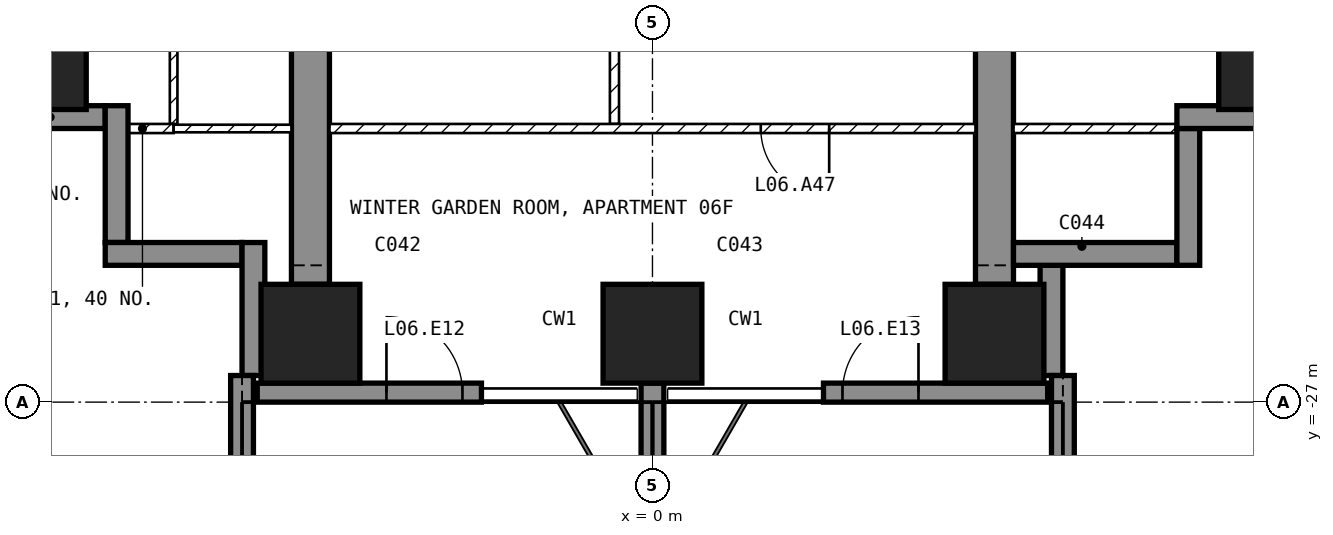
"""IFC4 building model, lengths in metres.
Left out: names, types, materials, properties, quantities, classifications, styles, units other than length and angle.
Written with IfcOpenShell. Run it as: python <this file> out.ifc"""

import sys

from ifc_helpers import new_model, si_unit, direction, frame, frame_2d, origin, origin_2d, place, context, subcontext, project, spatial, polyline, rectangle, outline, extrude, element, fill, save


model = new_model("IFC4")
c1 = context("Model", 3, precision=1e-05, world=origin(), true_north=direction((0.0, 1.0)))
c2 = subcontext(c1, "Body", "Model", "MODEL_VIEW")
j1 = project(units=[si_unit("LENGTHUNIT", "METRE"), si_unit("PLANEANGLEUNIT", "RADIAN")], contexts=[c1])
p1 = place(None, origin())
s1 = spatial("IfcSite", under=j1, at=p1, CompositionType="ELEMENT")
p2 = place(p1, origin())
s2 = spatial("IfcBuilding", under=s1, at=p2, CompositionType="ELEMENT")
p3 = place(p2, frame((0.0, 0.0, 40.0)))
s3 = spatial("IfcBuildingStorey", under=s2, at=p3, CompositionType="ELEMENT", Elevation=40.0)
for number, where, z_axis, x_axis in (
    (1, (-8.1, -22.5, -0.25), (0.0, 0.0, 1.0), (1.0, 0.0, 0.0)),
    (2, (-4.5, -26.1, -0.25), (0.0, 0.0, 1.0), (1.0, 0.0, 0.0)),
    (3, (0.0, -26.1, -0.25), (0.0, 0.0, 1.0), (1.0, 0.0, 0.0)),
    (4, (4.5, -26.1, -0.25), (0.0, 0.0, 1.0), (1.0, 0.0, 0.0)),
    (5, (8.1, -22.5, -0.25), (0.0, 0.0, 1.0), (1.0, 0.0, 0.0)),
):
    element("IfcColumn", number, at=place(p3, frame(where, z_axis=z_axis, x_axis=x_axis)), inside=s3, PredefinedType="COLUMN", context=c2, shape_type="SweptSolid", body=[
        extrude(rectangle(XDim=1.3, YDim=1.3, at=origin_2d()), origin(), (0.0, 0.0, 1.0), 3.5),
    ])
for number, where, z_axis, x_axis in (
    (6, (-4.75, -25.45, -0.25), (1.0, 0.0, 0.0), (0.0, 1.0, 0.0)),
    (7, (4.25, -25.45, -0.25), (1.0, 0.0, 0.0), (0.0, 1.0, 0.0)),
):
    element("IfcWall", number, at=place(p3, frame(where, z_axis=z_axis, x_axis=x_axis)), inside=s3, PredefinedType="SHEAR", context=c2, shape_type="SweptSolid", body=[
        extrude(outline(polyline([(0.0, 0.0), (4.15, 0.0), (4.15, 2.65), (6.55, 2.65), (6.55, 0.0), (11.95, 0.0), (11.95, 2.65), (14.35, 2.65), (14.35, 0.0), (16.45, 0.0), (16.45, 3.5), (0.0, 3.5), (0.0, 0.0)])), origin(), (0.0, 0.0, 1.0), 0.5),
    ])
p4 = place(p3, frame((-5.2, -26.875, 0.0), z_axis=(0.0, 0.0, 1.0), x_axis=(1.0, 0.0, 0.0)))
e8 = element("IfcWall", 8, at=p4, inside=s3, PredefinedType="SOLIDWALL", context=c2, shape_type="SweptSolid", body=[
    extrude(rectangle(XDim=2.95, YDim=0.25, at=frame_2d((1.475, 0.0))), origin(), (0.0, 0.0, 1.0), 3.25),
])
p5 = place(p4, frame((1.7, 0.0, 0.0)))
e9 = element("IfcOpeningElement", 9, at=p5, cuts=e8, PredefinedType="OPENING", context=c2, shape_type="SweptSolid", body=[
    extrude(rectangle(XDim=1.0, YDim=2.4, at=frame_2d((0.5, 1.2))), frame((0.0, 0.135, 0.0), z_axis=(0.0, -1.0, 0.0), x_axis=(1.0, 0.0, 0.0)), (0.0, 0.0, 1.0), 0.27),
])
p6 = place(p3, frame((2.25, -26.875, 0.0), z_axis=(0.0, 0.0, 1.0), x_axis=(1.0, 0.0, 0.0)))
e10 = element("IfcWall", 10, at=p6, inside=s3, PredefinedType="SOLIDWALL", context=c2, shape_type="SweptSolid", body=[
    extrude(rectangle(XDim=2.95, YDim=0.25, at=frame_2d((1.475, 0.0))), origin(), (0.0, 0.0, 1.0), 3.25),
])
p7 = place(p6, frame((0.25, 0.0, 0.0)))
e11 = element("IfcOpeningElement", 11, at=p7, cuts=e10, PredefinedType="OPENING", context=c2, shape_type="SweptSolid", body=[
    extrude(rectangle(XDim=1.0, YDim=2.4, at=frame_2d((0.5, 1.2))), frame((0.0, 0.135, 0.0), z_axis=(0.0, -1.0, 0.0), x_axis=(1.0, 0.0, 0.0)), (0.0, 0.0, 1.0), 0.27),
])
p8 = place(p3, frame((5.25, -26.65, 0.0), z_axis=(0.0, 0.0, 1.0), x_axis=(0.0, 1.0, 0.0)))
e12 = element("IfcWall", 12, at=p8, inside=s3, PredefinedType="SOLIDWALL", context=c2, shape_type="SweptSolid", body=[
    extrude(rectangle(XDim=1.45, YDim=0.3, at=frame_2d((0.725, 0.0))), origin(), (0.0, 0.0, 1.0), 3.25),
])
p9 = place(p3, frame((4.75, -25.05, 0.0), z_axis=(0.0, 0.0, 1.0), x_axis=(1.0, 0.0, 0.0)))
e13 = element("IfcWall", 13, at=p9, inside=s3, PredefinedType="SOLIDWALL", context=c2, shape_type="SweptSolid", body=[
    extrude(rectangle(XDim=2.15, YDim=0.3, at=frame_2d((1.075, 0.0))), origin(), (0.0, 0.0, 1.0), 3.25),
])
p10 = place(p3, frame((7.05, -25.2, 0.0), z_axis=(0.0, 0.0, 1.0), x_axis=(0.0, 1.0, 0.0)))
e14 = element("IfcWall", 14, at=p10, inside=s3, PredefinedType="SOLIDWALL", context=c2, shape_type="SweptSolid", body=[
    extrude(rectangle(XDim=1.8, YDim=0.3, at=frame_2d((0.9, 0.0))), origin(), (0.0, 0.0, 1.0), 3.25),
])
p11 = place(p3, frame((6.9, -23.25, 0.0), z_axis=(0.0, 0.0, 1.0), x_axis=(1.0, 0.0, 0.0)))
e15 = element("IfcWall", 15, at=p11, inside=s3, PredefinedType="SOLIDWALL", context=c2, shape_type="SweptSolid", body=[
    extrude(rectangle(XDim=1.75, YDim=0.3, at=frame_2d((0.875, 0.0))), origin(), (0.0, 0.0, 1.0), 3.25),
])
p12 = place(p3, frame((-8.65, -23.25, 0.0), z_axis=(0.0, 0.0, 1.0), x_axis=(1.0, 0.0, 0.0)))
e16 = element("IfcWall", 16, at=p12, inside=s3, PredefinedType="SOLIDWALL", context=c2, shape_type="SweptSolid", body=[
    extrude(rectangle(XDim=1.45, YDim=0.3, at=frame_2d((0.725, 0.0))), origin(), (0.0, 0.0, 1.0), 3.25),
])
p13 = place(p3, frame((-7.05, -23.1, 0.0), z_axis=(0.0, 0.0, 1.0), x_axis=(0.0, -1.0, 0.0)))
e17 = element("IfcWall", 17, at=p13, inside=s3, PredefinedType="SOLIDWALL", context=c2, shape_type="SweptSolid", body=[
    extrude(rectangle(XDim=1.8, YDim=0.3, at=frame_2d((0.9, 0.0))), origin(), (0.0, 0.0, 1.0), 3.25),
])
p14 = place(p3, frame((-7.2, -25.05, 0.0), z_axis=(0.0, 0.0, 1.0), x_axis=(1.0, 0.0, 0.0)))
e18 = element("IfcWall", 18, at=p14, inside=s3, PredefinedType="SOLIDWALL", context=c2, shape_type="SweptSolid", body=[
    extrude(rectangle(XDim=1.8, YDim=0.3, at=frame_2d((0.9, 0.0))), origin(), (0.0, 0.0, 1.0), 3.25),
])
p15 = place(p3, frame((-5.25, -24.9, 0.0), z_axis=(0.0, 0.0, 1.0), x_axis=(0.0, -1.0, 0.0)))
e19 = element("IfcWall", 19, at=p15, inside=s3, PredefinedType="SOLIDWALL", context=c2, shape_type="SweptSolid", body=[
    extrude(rectangle(XDim=1.75, YDim=0.3, at=frame_2d((0.875, 0.0))), origin(), (0.0, 0.0, 1.0), 3.25),
])
p16 = place(p3, frame((-5.4, -26.65, 0.0), z_axis=(0.0, 0.0, 1.0), x_axis=(0.0, -1.0, 0.0)))
e20 = element("IfcWall", 20, at=p16, inside=s3, PredefinedType="SOLIDWALL", context=c2, shape_type="SweptSolid", body=[
    extrude(rectangle(XDim=3.05, YDim=0.3, at=frame_2d((1.525, 0.0))), origin(), (0.0, 0.0, 1.0), 3.25),
])
p17 = place(p3, frame((0.0, -26.75, 0.0), z_axis=(0.0, 0.0, 1.0), x_axis=(0.0, -1.0, 0.0)))
e21 = element("IfcWall", 21, at=p17, inside=s3, PredefinedType="SOLIDWALL", context=c2, shape_type="SweptSolid", body=[
    extrude(rectangle(XDim=2.95, YDim=0.3, at=frame_2d((1.475, 0.0))), origin(), (0.0, 0.0, 1.0), 3.25),
])
p18 = place(p3, frame((5.4, -26.65, 0.0), z_axis=(0.0, 0.0, 1.0), x_axis=(0.0, -1.0, 0.0)))
e22 = element("IfcWall", 22, at=p18, inside=s3, PredefinedType="SOLIDWALL", context=c2, shape_type="SweptSolid", body=[
    extrude(rectangle(XDim=3.05, YDim=0.3, at=frame_2d((1.525, 0.0))), origin(), (0.0, 0.0, 1.0), 3.25),
])
p19 = place(p3, frame((-0.5, -23.34, 0.0), z_axis=(0.0, 0.0, 1.0), x_axis=(0.0, 1.0, 0.0)))
e23 = element("IfcWall", 23, at=p19, inside=s3, PredefinedType="PARTITIONING", context=c2, shape_type="SweptSolid", body=[
    extrude(rectangle(XDim=4.38, YDim=0.12, at=frame_2d((2.19, 0.0))), origin(), (0.0, 0.0, 1.0), 3.25),
])
p20 = place(p19, frame((1.74, 0.0, 0.0)))
e24 = element("IfcOpeningElement", 24, at=p20, cuts=e23, PredefinedType="OPENING", context=c2, shape_type="SweptSolid", body=[
    extrude(rectangle(XDim=0.9, YDim=2.1, at=frame_2d((0.45, 1.05))), frame((0.0, 0.07, 0.0), z_axis=(0.0, -1.0, 0.0), x_axis=(1.0, 0.0, 0.0)), (0.0, 0.0, 1.0), 0.14),
])
p21 = place(p3, frame((4.25, -23.4, 0.0), z_axis=(0.0, 0.0, 1.0), x_axis=(-1.0, 0.0, 0.0)))
e25 = element("IfcWall", 25, at=p21, inside=s3, PredefinedType="PARTITIONING", context=c2, shape_type="SweptSolid", body=[
    extrude(rectangle(XDim=8.5, YDim=0.12, at=frame_2d((4.25, 0.0))), origin(), (0.0, 0.0, 1.0), 3.25),
])
p22 = place(p21, frame((1.925, 0.0, 0.0)))
e26 = element("IfcOpeningElement", 26, at=p22, cuts=e25, PredefinedType="OPENING", context=c2, shape_type="SweptSolid", body=[
    extrude(rectangle(XDim=0.9, YDim=2.1, at=frame_2d((0.45, 1.05))), frame((0.0, 0.07, 0.0), z_axis=(0.0, -1.0, 0.0), x_axis=(1.0, 0.0, 0.0)), (0.0, 0.0, 1.0), 0.14),
])
p23 = place(p3, frame((7.12, -23.4, 0.0), z_axis=(0.0, 0.0, 1.0), x_axis=(-1.0, 0.0, 0.0)))
e27 = element("IfcWall", 27, at=p23, inside=s3, PredefinedType="PARTITIONING", context=c2, shape_type="SweptSolid", body=[
    extrude(rectangle(XDim=2.37, YDim=0.12, at=frame_2d((1.185, 0.0))), origin(), (0.0, 0.0, 1.0), 3.25),
])
p24 = place(p3, frame((-6.3, -20.45, 0.0), z_axis=(0.0, 0.0, 1.0), x_axis=(0.0, -1.0, 0.0)))
e28 = element("IfcWall", 28, at=p24, inside=s3, PredefinedType="PARTITIONING", context=c2, shape_type="SweptSolid", body=[
    extrude(rectangle(XDim=2.89, YDim=0.1, at=frame_2d((1.445, 0.0))), origin(), (0.0, 0.0, 1.0), 3.25),
])
p25 = place(p3, frame((-6.3, -23.4, 0.0), z_axis=(0.0, 0.0, 1.0), x_axis=(-1.0, 0.0, 0.0)))
e29 = element("IfcWall", 29, at=p25, inside=s3, PredefinedType="PARTITIONING", context=c2, shape_type="SweptSolid", body=[
    extrude(rectangle(XDim=0.82, YDim=0.12, at=frame_2d((0.41, 0.0))), origin(), (0.0, 0.0, 1.0), 3.25),
])
p26 = place(p3, frame((-4.75, -23.4, 0.0), z_axis=(0.0, 0.0, 1.0), x_axis=(-1.0, 0.0, 0.0)))
e30 = element("IfcWall", 30, at=p26, inside=s3, PredefinedType="PARTITIONING", context=c2, shape_type="SweptSolid", body=[
    extrude(rectangle(XDim=1.55, YDim=0.1, at=frame_2d((0.775, 0.0))), origin(), (0.0, 0.0, 1.0), 3.25),
])
p27 = place(p5, origin())
e31 = element("IfcDoor", 31, at=p27, inside=s3, OperationType="SINGLE_SWING_LEFT", PredefinedType="DOOR", context=c2, shape_type="SweptSolid", body=[
    extrude(rectangle(XDim=1.0, YDim=2.4, at=frame_2d((0.5, 1.2))), frame((0.0, 0.025, 0.0), z_axis=(0.0, -1.0, 0.0), x_axis=(1.0, 0.0, 0.0)), (0.0, 0.0, 1.0), 0.05),
])
fill(e9, e31)
p28 = place(p7, origin())
e32 = element("IfcDoor", 32, at=p28, inside=s3, OperationType="SINGLE_SWING_RIGHT", PredefinedType="DOOR", context=c2, shape_type="SweptSolid", body=[
    extrude(rectangle(XDim=1.0, YDim=2.4, at=frame_2d((0.5, 1.2))), frame((0.0, 0.025, 0.0), z_axis=(0.0, -1.0, 0.0), x_axis=(1.0, 0.0, 0.0)), (0.0, 0.0, 1.0), 0.05),
])
fill(e11, e32)
p29 = place(p22, origin())
e33 = element("IfcDoor", 33, at=p29, inside=s3, OperationType="SINGLE_SWING_LEFT", PredefinedType="DOOR", context=c2, shape_type="SweptSolid", body=[
    extrude(rectangle(XDim=0.9, YDim=2.1, at=frame_2d((0.45, 1.05))), frame((0.0, 0.025, 0.0), z_axis=(0.0, -1.0, 0.0), x_axis=(1.0, 0.0, 0.0)), (0.0, 0.0, 1.0), 0.05),
])
fill(e26, e33)
save(model, sys.argv[1])
